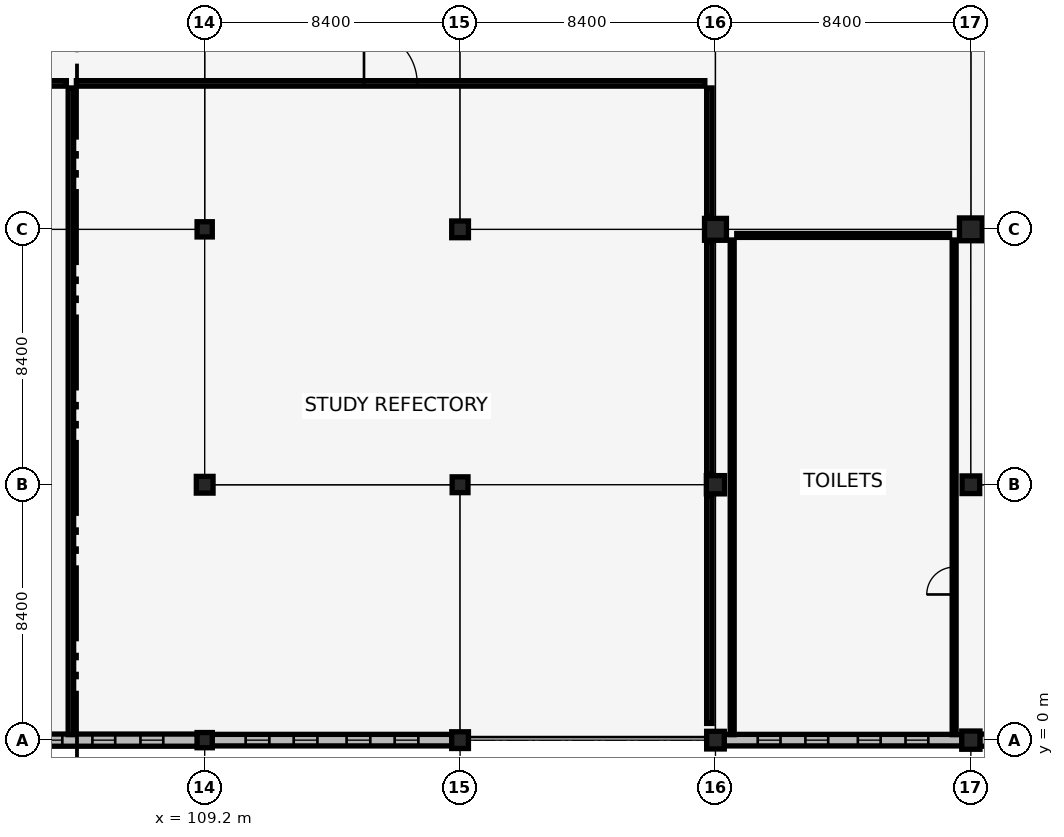
"""IFC4 building model, lengths in metres.
Left out: names, types, materials, properties, quantities, classifications, styles, units other than length and angle.
Written with IfcOpenShell. Run it as: python <this file> out.ifc"""

import sys

from ifc_helpers import new_model, si_unit, direction, frame, frame_2d, origin, origin_2d, place, context, subcontext, project, spatial, rectangle, extrude, element, fill, save


model = new_model("IFC4")
c1 = context("Model", 3, precision=1e-05, world=origin(), true_north=direction((0.0, 1.0)))
c2 = subcontext(c1, "Body", "Model", "MODEL_VIEW")
j1 = project(units=[si_unit("LENGTHUNIT", "METRE"), si_unit("PLANEANGLEUNIT", "RADIAN")], contexts=[c1])
p1 = place(None, origin())
s1 = spatial("IfcSite", under=j1, at=p1, CompositionType="ELEMENT")
p2 = place(p1, origin())
s2 = spatial("IfcBuilding", under=s1, at=p2, CompositionType="ELEMENT")
p3 = place(p2, frame((0.0, 0.0, 5.44)))
s3 = spatial("IfcBuildingStorey", under=s2, at=p3, CompositionType="ELEMENT", Elevation=5.44)
p4 = place(p3, frame((109.2, 0.0, 0.0), z_axis=(0.0, 0.0, 1.0), x_axis=(1.0, 0.0, 0.0)))
e1 = element("IfcColumn", 1, at=p4, inside=s3, PredefinedType="COLUMN", context=c2, shape_type="SweptSolid", body=[
    extrude(rectangle(XDim=0.5, YDim=0.5, at=origin_2d()), origin(), (0.0, 0.0, 1.0), 4.12),
])
p5 = place(p3, frame((109.2, 8.4, 0.0), z_axis=(0.0, 0.0, 1.0), x_axis=(1.0, 0.0, 0.0)))
e2 = element("IfcColumn", 2, at=p5, inside=s3, PredefinedType="COLUMN", context=c2, shape_type="SweptSolid", body=[
    extrude(rectangle(XDim=0.55, YDim=0.55, at=origin_2d()), origin(), (0.0, 0.0, 1.0), 4.12),
])
p6 = place(p3, frame((109.2, 16.8, 0.0), z_axis=(0.0, 0.0, 1.0), x_axis=(1.0, 0.0, 0.0)))
e3 = element("IfcColumn", 3, at=p6, inside=s3, PredefinedType="COLUMN", context=c2, shape_type="SweptSolid", body=[
    extrude(rectangle(XDim=0.5, YDim=0.5, at=origin_2d()), origin(), (0.0, 0.0, 1.0), 4.12),
])
p7 = place(p3, frame((117.6, 0.0, 0.0), z_axis=(0.0, 0.0, 1.0), x_axis=(1.0, 0.0, 0.0)))
e4 = element("IfcColumn", 4, at=p7, inside=s3, PredefinedType="COLUMN", context=c2, shape_type="SweptSolid", body=[
    extrude(rectangle(XDim=0.55, YDim=0.55, at=origin_2d()), origin(), (0.0, 0.0, 1.0), 4.12),
])
p8 = place(p3, frame((117.6, 8.4, 0.0), z_axis=(0.0, 0.0, 1.0), x_axis=(1.0, 0.0, 0.0)))
e5 = element("IfcColumn", 5, at=p8, inside=s3, PredefinedType="COLUMN", context=c2, shape_type="SweptSolid", body=[
    extrude(rectangle(XDim=0.52, YDim=0.52, at=origin_2d()), origin(), (0.0, 0.0, 1.0), 4.12),
])
p9 = place(p3, frame((117.6, 16.8, 0.0), z_axis=(0.0, 0.0, 1.0), x_axis=(1.0, 0.0, 0.0)))
e6 = element("IfcColumn", 6, at=p9, inside=s3, PredefinedType="COLUMN", context=c2, shape_type="SweptSolid", body=[
    extrude(rectangle(XDim=0.55, YDim=0.55, at=origin_2d()), origin(), (0.0, 0.0, 1.0), 4.12),
])
p10 = place(p3, frame((126.0, 0.0, 0.0), z_axis=(0.0, 0.0, 1.0), x_axis=(1.0, 0.0, 0.0)))
e7 = element("IfcColumn", 7, at=p10, inside=s3, PredefinedType="COLUMN", context=c2, shape_type="SweptSolid", body=[
    extrude(rectangle(XDim=0.58, YDim=0.58, at=origin_2d()), origin(), (0.0, 0.0, 1.0), 4.12),
])
p11 = place(p3, frame((126.0, 8.4, 0.0), z_axis=(0.0, 0.0, 1.0), x_axis=(1.0, 0.0, 0.0)))
e8 = element("IfcColumn", 8, at=p11, inside=s3, PredefinedType="COLUMN", context=c2, shape_type="SweptSolid", body=[
    extrude(rectangle(XDim=0.6, YDim=0.6, at=origin_2d()), origin(), (0.0, 0.0, 1.0), 4.12),
])
p12 = place(p3, frame((126.0, 16.8, 0.0), z_axis=(0.0, 0.0, 1.0), x_axis=(1.0, 0.0, 0.0)))
e9 = element("IfcColumn", 9, at=p12, inside=s3, PredefinedType="COLUMN", context=c2, shape_type="SweptSolid", body=[
    extrude(rectangle(XDim=0.72, YDim=0.72, at=origin_2d()), origin(), (0.0, 0.0, 1.0), 4.12),
])
p13 = place(p3, frame((134.4, 0.0, 0.0), z_axis=(0.0, 0.0, 1.0), x_axis=(1.0, 0.0, 0.0)))
e10 = element("IfcColumn", 10, at=p13, inside=s3, PredefinedType="COLUMN", context=c2, shape_type="SweptSolid", body=[
    extrude(rectangle(XDim=0.6, YDim=0.6, at=origin_2d()), origin(), (0.0, 0.0, 1.0), 4.12),
])
p14 = place(p3, frame((134.4, 8.4, 0.0), z_axis=(0.0, 0.0, 1.0), x_axis=(1.0, 0.0, 0.0)))
e11 = element("IfcColumn", 11, at=p14, inside=s3, PredefinedType="COLUMN", context=c2, shape_type="SweptSolid", body=[
    extrude(rectangle(XDim=0.58, YDim=0.58, at=origin_2d()), origin(), (0.0, 0.0, 1.0), 4.12),
])
p15 = place(p3, frame((134.4, 16.8, 0.0), z_axis=(0.0, 0.0, 1.0), x_axis=(1.0, 0.0, 0.0)))
e12 = element("IfcColumn", 12, at=p15, inside=s3, PredefinedType="COLUMN", context=c2, shape_type="SweptSolid", body=[
    extrude(rectangle(XDim=0.75, YDim=0.75, at=origin_2d()), origin(), (0.0, 0.0, 1.0), 4.12),
])
p16 = place(p3, frame((101.06, 0.0, 0.0), z_axis=(0.0, 0.0, 1.0), x_axis=(1.0, 0.0, 0.0)))
e13 = element("IfcWall", 13, at=p16, inside=s3, PredefinedType="SOLIDWALL", context=c2, shape_type="SweptSolid", body=[
    extrude(rectangle(XDim=7.905, YDim=0.4, at=frame_2d((3.953, 0.0))), origin(), (0.0, 0.0, 1.0), 3.38),
])
p17 = place(p16, frame((1.127, 0.0, 0.7)))
e14 = element("IfcOpeningElement", 14, at=p17, cuts=e13, PredefinedType="OPENING", context=c2, shape_type="SweptSolid", body=[
    extrude(rectangle(XDim=0.75, YDim=2.1, at=frame_2d((0.375, 1.05))), frame((0.0, 0.21, 0.0), z_axis=(0.0, -1.0, 0.0), x_axis=(1.0, 0.0, 0.0)), (0.0, 0.0, 1.0), 0.42),
])
p18 = place(p16, frame((2.708, 0.0, 0.7)))
e15 = element("IfcOpeningElement", 15, at=p18, cuts=e13, PredefinedType="OPENING", context=c2, shape_type="SweptSolid", body=[
    extrude(rectangle(XDim=0.75, YDim=2.1, at=frame_2d((0.375, 1.05))), frame((0.0, 0.21, 0.0), z_axis=(0.0, -1.0, 0.0), x_axis=(1.0, 0.0, 0.0)), (0.0, 0.0, 1.0), 0.42),
])
p19 = place(p16, frame((4.447, 0.0, 0.7)))
e16 = element("IfcOpeningElement", 16, at=p19, cuts=e13, PredefinedType="OPENING", context=c2, shape_type="SweptSolid", body=[
    extrude(rectangle(XDim=0.75, YDim=2.1, at=frame_2d((0.375, 1.05))), frame((0.0, 0.21, 0.0), z_axis=(0.0, -1.0, 0.0), x_axis=(1.0, 0.0, 0.0)), (0.0, 0.0, 1.0), 0.42),
])
p20 = place(p16, frame((6.028, 0.0, 0.7)))
e17 = element("IfcOpeningElement", 17, at=p20, cuts=e13, PredefinedType="OPENING", context=c2, shape_type="SweptSolid", body=[
    extrude(rectangle(XDim=0.75, YDim=2.1, at=frame_2d((0.375, 1.05))), frame((0.0, 0.21, 0.0), z_axis=(0.0, -1.0, 0.0), x_axis=(1.0, 0.0, 0.0)), (0.0, 0.0, 1.0), 0.42),
])
p21 = place(p3, frame((109.435, 0.0, 0.0), z_axis=(0.0, 0.0, 1.0), x_axis=(1.0, 0.0, 0.0)))
e18 = element("IfcWall", 18, at=p21, inside=s3, PredefinedType="SOLIDWALL", context=c2, shape_type="SweptSolid", body=[
    extrude(rectangle(XDim=7.905, YDim=0.38, at=frame_2d((3.953, 0.0))), origin(), (0.0, 0.0, 1.0), 3.38),
])
p22 = place(p21, frame((1.112, 0.0, 0.7)))
e19 = element("IfcOpeningElement", 19, at=p22, cuts=e18, PredefinedType="OPENING", context=c2, shape_type="SweptSolid", body=[
    extrude(rectangle(XDim=0.78, YDim=2.35, at=frame_2d((0.39, 1.175))), frame((0.0, 0.2, 0.0), z_axis=(0.0, -1.0, 0.0), x_axis=(1.0, 0.0, 0.0)), (0.0, 0.0, 1.0), 0.4),
])
p23 = place(p21, frame((2.693, 0.0, 0.7)))
e20 = element("IfcOpeningElement", 20, at=p23, cuts=e18, PredefinedType="OPENING", context=c2, shape_type="SweptSolid", body=[
    extrude(rectangle(XDim=0.78, YDim=2.35, at=frame_2d((0.39, 1.175))), frame((0.0, 0.2, 0.0), z_axis=(0.0, -1.0, 0.0), x_axis=(1.0, 0.0, 0.0)), (0.0, 0.0, 1.0), 0.4),
])
p24 = place(p21, frame((4.432, 0.0, 0.7)))
e21 = element("IfcOpeningElement", 21, at=p24, cuts=e18, PredefinedType="OPENING", context=c2, shape_type="SweptSolid", body=[
    extrude(rectangle(XDim=0.78, YDim=2.35, at=frame_2d((0.39, 1.175))), frame((0.0, 0.2, 0.0), z_axis=(0.0, -1.0, 0.0), x_axis=(1.0, 0.0, 0.0)), (0.0, 0.0, 1.0), 0.4),
])
p25 = place(p21, frame((6.013, 0.0, 0.7)))
e22 = element("IfcOpeningElement", 22, at=p25, cuts=e18, PredefinedType="OPENING", context=c2, shape_type="SweptSolid", body=[
    extrude(rectangle(XDim=0.78, YDim=2.35, at=frame_2d((0.39, 1.175))), frame((0.0, 0.2, 0.0), z_axis=(0.0, -1.0, 0.0), x_axis=(1.0, 0.0, 0.0)), (0.0, 0.0, 1.0), 0.4),
])
p26 = place(p3, frame((126.275, 0.0, 0.0), z_axis=(0.0, 0.0, 1.0), x_axis=(1.0, 0.0, 0.0)))
e23 = element("IfcWall", 23, at=p26, inside=s3, PredefinedType="SOLIDWALL", context=c2, shape_type="SweptSolid", body=[
    extrude(rectangle(XDim=7.84, YDim=0.38, at=frame_2d((3.92, 0.0))), origin(), (0.0, 0.0, 1.0), 3.38),
])
p27 = place(p26, frame((1.115, 0.0, 0.7)))
e24 = element("IfcOpeningElement", 24, at=p27, cuts=e23, PredefinedType="OPENING", context=c2, shape_type="SweptSolid", body=[
    extrude(rectangle(XDim=0.75, YDim=2.1, at=frame_2d((0.375, 1.05))), frame((0.0, 0.2, 0.0), z_axis=(0.0, -1.0, 0.0), x_axis=(1.0, 0.0, 0.0)), (0.0, 0.0, 1.0), 0.4),
])
p28 = place(p26, frame((2.683, 0.0, 0.7)))
e25 = element("IfcOpeningElement", 25, at=p28, cuts=e23, PredefinedType="OPENING", context=c2, shape_type="SweptSolid", body=[
    extrude(rectangle(XDim=0.75, YDim=2.1, at=frame_2d((0.375, 1.05))), frame((0.0, 0.2, 0.0), z_axis=(0.0, -1.0, 0.0), x_axis=(1.0, 0.0, 0.0)), (0.0, 0.0, 1.0), 0.4),
])
p29 = place(p26, frame((4.407, 0.0, 0.7)))
e26 = element("IfcOpeningElement", 26, at=p29, cuts=e23, PredefinedType="OPENING", context=c2, shape_type="SweptSolid", body=[
    extrude(rectangle(XDim=0.75, YDim=2.1, at=frame_2d((0.375, 1.05))), frame((0.0, 0.2, 0.0), z_axis=(0.0, -1.0, 0.0), x_axis=(1.0, 0.0, 0.0)), (0.0, 0.0, 1.0), 0.4),
])
p30 = place(p26, frame((5.975, 0.0, 0.7)))
e27 = element("IfcOpeningElement", 27, at=p30, cuts=e23, PredefinedType="OPENING", context=c2, shape_type="SweptSolid", body=[
    extrude(rectangle(XDim=0.75, YDim=2.1, at=frame_2d((0.375, 1.05))), frame((0.0, 0.2, 0.0), z_axis=(0.0, -1.0, 0.0), x_axis=(1.0, 0.0, 0.0)), (0.0, 0.0, 1.0), 0.4),
])
p31 = place(p3, frame((134.685, 0.0, 0.0), z_axis=(0.0, 0.0, 1.0), x_axis=(1.0, 0.0, 0.0)))
e28 = element("IfcWall", 28, at=p31, inside=s3, PredefinedType="SOLIDWALL", context=c2, shape_type="SweptSolid", body=[
    extrude(rectangle(XDim=7.84, YDim=0.4, at=frame_2d((3.92, 0.0))), origin(), (0.0, 0.0, 1.0), 3.38),
])
p32 = place(p31, frame((1.115, 0.0, 0.7)))
e29 = element("IfcOpeningElement", 29, at=p32, cuts=e28, PredefinedType="OPENING", context=c2, shape_type="SweptSolid", body=[
    extrude(rectangle(XDim=0.75, YDim=2.1, at=frame_2d((0.375, 1.05))), frame((0.0, 0.21, 0.0), z_axis=(0.0, -1.0, 0.0), x_axis=(1.0, 0.0, 0.0)), (0.0, 0.0, 1.0), 0.42),
])
p33 = place(p31, frame((4.407, 0.0, 0.7)))
e30 = element("IfcOpeningElement", 30, at=p33, cuts=e28, PredefinedType="OPENING", context=c2, shape_type="SweptSolid", body=[
    extrude(rectangle(XDim=0.75, YDim=2.1, at=frame_2d((0.375, 1.05))), frame((0.0, 0.21, 0.0), z_axis=(0.0, -1.0, 0.0), x_axis=(1.0, 0.0, 0.0)), (0.0, 0.0, 1.0), 0.42),
])
p34 = place(p31, frame((5.975, 0.0, 0.7)))
e31 = element("IfcOpeningElement", 31, at=p34, cuts=e28, PredefinedType="OPENING", context=c2, shape_type="SweptSolid", body=[
    extrude(rectangle(XDim=0.75, YDim=2.1, at=frame_2d((0.375, 1.05))), frame((0.0, 0.21, 0.0), z_axis=(0.0, -1.0, 0.0), x_axis=(1.0, 0.0, 0.0)), (0.0, 0.0, 1.0), 0.42),
])
p35 = place(p3, frame((84.03, 21.6, 0.0), z_axis=(0.0, 0.0, 1.0), x_axis=(1.0, 0.0, 0.0)))
e32 = element("IfcWall", 32, at=p35, inside=s3, PredefinedType="PARTITIONING", context=c2, shape_type="SweptSolid", body=[
    extrude(rectangle(XDim=20.62, YDim=0.18, at=frame_2d((10.31, 0.0))), origin(), (0.0, 0.0, 1.0), 3.47),
])
p36 = place(p35, frame((9.435, 0.0, 0.0)))
e33 = element("IfcOpeningElement", 33, at=p36, cuts=e32, PredefinedType="OPENING", context=c2, shape_type="SweptSolid", body=[
    extrude(rectangle(XDim=1.75, YDim=2.3, at=frame_2d((0.875, 1.15))), frame((0.0, 0.1, 0.0), z_axis=(0.0, -1.0, 0.0), x_axis=(1.0, 0.0, 0.0)), (0.0, 0.0, 1.0), 0.2),
])
p37 = place(p3, frame((104.8, 0.18, 0.0), z_axis=(0.0, 0.0, 1.0), x_axis=(0.0, 1.0, 0.0)))
e34 = element("IfcWall", 34, at=p37, inside=s3, PredefinedType="PARTITIONING", context=c2, shape_type="SweptSolid", body=[
    extrude(rectangle(XDim=21.27, YDim=0.18, at=frame_2d((10.635, 0.0))), origin(), (0.0, 0.0, 1.0), 3.34),
])
p38 = place(p3, frame((104.98, 21.6, 0.0), z_axis=(0.0, 0.0, 1.0), x_axis=(1.0, 0.0, 0.0)))
e35 = element("IfcWall", 35, at=p38, inside=s3, PredefinedType="PARTITIONING", context=c2, shape_type="SweptSolid", body=[
    extrude(rectangle(XDim=20.67, YDim=0.18, at=frame_2d((10.335, 0.0))), origin(), (0.0, 0.0, 1.0), 3.47),
])
p39 = place(p38, frame((9.46, 0.0, 0.0)))
e36 = element("IfcOpeningElement", 36, at=p39, cuts=e35, PredefinedType="OPENING", context=c2, shape_type="SweptSolid", body=[
    extrude(rectangle(XDim=1.75, YDim=2.3, at=frame_2d((0.875, 1.15))), frame((0.0, 0.1, 0.0), z_axis=(0.0, -1.0, 0.0), x_axis=(1.0, 0.0, 0.0)), (0.0, 0.0, 1.0), 0.2),
])
p40 = place(p3, frame((125.8, 0.55, 0.0), z_axis=(0.0, 0.0, 1.0), x_axis=(0.0, 1.0, 0.0)))
e37 = element("IfcWall", 37, at=p40, inside=s3, PredefinedType="PARTITIONING", context=c2, shape_type="SweptSolid", body=[
    extrude(rectangle(XDim=7.49, YDim=0.18, at=frame_2d((3.745, 0.0))), origin(), (0.0, 0.0, 1.0), 3.6),
])
p41 = place(p3, frame((125.8, 8.76, 0.0), z_axis=(0.0, 0.0, 1.0), x_axis=(0.0, 1.0, 0.0)))
e38 = element("IfcWall", 38, at=p41, inside=s3, PredefinedType="PARTITIONING", context=c2, shape_type="SweptSolid", body=[
    extrude(rectangle(XDim=7.62, YDim=0.18, at=frame_2d((3.81, 0.0))), origin(), (0.0, 0.0, 1.0), 3.62),
])
p42 = place(p3, frame((125.8, 17.22, 0.0), z_axis=(0.0, 0.0, 1.0), x_axis=(0.0, 1.0, 0.0)))
e39 = element("IfcWall", 39, at=p42, inside=s3, PredefinedType="PARTITIONING", context=c2, shape_type="SweptSolid", body=[
    extrude(rectangle(XDim=4.23, YDim=0.18, at=frame_2d((2.115, 0.0))), origin(), (0.0, 0.0, 1.0), 3.6),
])
p43 = place(p3, frame((133.85, 0.18, 0.0), z_axis=(0.0, 0.0, 1.0), x_axis=(0.0, 1.0, 0.0)))
e40 = element("IfcWall", 40, at=p43, inside=s3, PredefinedType="PARTITIONING", context=c2, shape_type="SweptSolid", body=[
    extrude(rectangle(XDim=16.27, YDim=0.13, at=frame_2d((8.135, 0.0))), origin(), (0.0, 0.0, 1.0), 3.38),
])
p44 = place(p43, frame((4.611, 0.0, 0.0)))
e41 = element("IfcOpeningElement", 41, at=p44, cuts=e40, PredefinedType="OPENING", context=c2, shape_type="SweptSolid", body=[
    extrude(rectangle(XDim=0.9, YDim=2.1, at=frame_2d((0.45, 1.05))), frame((0.0, 0.075, 0.0), z_axis=(0.0, -1.0, 0.0), x_axis=(1.0, 0.0, 0.0)), (0.0, 0.0, 1.0), 0.15),
])
p45 = place(p3, frame((126.7, 16.6, 0.0), z_axis=(0.0, 0.0, 1.0), x_axis=(1.0, 0.0, 0.0)))
e42 = element("IfcWall", 42, at=p45, inside=s3, PredefinedType="PARTITIONING", context=c2, shape_type="SweptSolid", body=[
    extrude(rectangle(XDim=7.0, YDim=0.13, at=frame_2d((3.5, 0.0))), origin(), (0.0, 0.0, 1.0), 3.34),
])
p46 = place(p3, frame((126.55, 0.18, 0.0), z_axis=(0.0, 0.0, 1.0), x_axis=(0.0, 1.0, 0.0)))
e43 = element("IfcWall", 43, at=p46, inside=s3, PredefinedType="PARTITIONING", context=c2, shape_type="SweptSolid", body=[
    extrude(rectangle(XDim=16.27, YDim=0.13, at=frame_2d((8.135, 0.0))), origin(), (0.0, 0.0, 1.0), 3.38),
])
p47 = place(p18, origin())
e44 = element("IfcWindow", 44, at=p47, inside=s3, PartitioningType="DOUBLE_PANEL_VERTICAL", PredefinedType="WINDOW", context=c2, shape_type="SweptSolid", body=[
    extrude(rectangle(XDim=0.75, YDim=2.1, at=frame_2d((0.375, 1.05))), frame((0.0, 0.03, 0.0), z_axis=(0.0, -1.0, 0.0), x_axis=(1.0, 0.0, 0.0)), (0.0, 0.0, 1.0), 0.06),
])
fill(e15, e44)
p48 = place(p19, origin())
e45 = element("IfcWindow", 45, at=p48, inside=s3, PartitioningType="DOUBLE_PANEL_VERTICAL", PredefinedType="WINDOW", context=c2, shape_type="SweptSolid", body=[
    extrude(rectangle(XDim=0.75, YDim=2.1, at=frame_2d((0.375, 1.05))), frame((0.0, 0.03, 0.0), z_axis=(0.0, -1.0, 0.0), x_axis=(1.0, 0.0, 0.0)), (0.0, 0.0, 1.0), 0.06),
])
fill(e16, e45)
p49 = place(p20, origin())
e46 = element("IfcWindow", 46, at=p49, inside=s3, PartitioningType="DOUBLE_PANEL_VERTICAL", PredefinedType="WINDOW", context=c2, shape_type="SweptSolid", body=[
    extrude(rectangle(XDim=0.75, YDim=2.1, at=frame_2d((0.375, 1.05))), frame((0.0, 0.03, 0.0), z_axis=(0.0, -1.0, 0.0), x_axis=(1.0, 0.0, 0.0)), (0.0, 0.0, 1.0), 0.06),
])
fill(e17, e46)
p50 = place(p22, origin())
e47 = element("IfcWindow", 47, at=p50, inside=s3, PartitioningType="DOUBLE_PANEL_VERTICAL", PredefinedType="WINDOW", context=c2, shape_type="SweptSolid", body=[
    extrude(rectangle(XDim=0.78, YDim=2.35, at=frame_2d((0.39, 1.175))), frame((0.0, 0.03, 0.0), z_axis=(0.0, -1.0, 0.0), x_axis=(1.0, 0.0, 0.0)), (0.0, 0.0, 1.0), 0.06),
])
fill(e19, e47)
p51 = place(p23, origin())
e48 = element("IfcWindow", 48, at=p51, inside=s3, PartitioningType="DOUBLE_PANEL_VERTICAL", PredefinedType="WINDOW", context=c2, shape_type="SweptSolid", body=[
    extrude(rectangle(XDim=0.78, YDim=2.35, at=frame_2d((0.39, 1.175))), frame((0.0, 0.03, 0.0), z_axis=(0.0, -1.0, 0.0), x_axis=(1.0, 0.0, 0.0)), (0.0, 0.0, 1.0), 0.06),
])
fill(e20, e48)
p52 = place(p24, origin())
e49 = element("IfcWindow", 49, at=p52, inside=s3, PartitioningType="DOUBLE_PANEL_VERTICAL", PredefinedType="WINDOW", context=c2, shape_type="SweptSolid", body=[
    extrude(rectangle(XDim=0.78, YDim=2.35, at=frame_2d((0.39, 1.175))), frame((0.0, 0.03, 0.0), z_axis=(0.0, -1.0, 0.0), x_axis=(1.0, 0.0, 0.0)), (0.0, 0.0, 1.0), 0.06),
])
fill(e21, e49)
p53 = place(p25, origin())
e50 = element("IfcWindow", 50, at=p53, inside=s3, PartitioningType="DOUBLE_PANEL_VERTICAL", PredefinedType="WINDOW", context=c2, shape_type="SweptSolid", body=[
    extrude(rectangle(XDim=0.78, YDim=2.35, at=frame_2d((0.39, 1.175))), frame((0.0, 0.03, 0.0), z_axis=(0.0, -1.0, 0.0), x_axis=(1.0, 0.0, 0.0)), (0.0, 0.0, 1.0), 0.06),
])
fill(e22, e50)
p54 = place(p27, origin())
e51 = element("IfcWindow", 51, at=p54, inside=s3, PartitioningType="DOUBLE_PANEL_VERTICAL", PredefinedType="WINDOW", context=c2, shape_type="SweptSolid", body=[
    extrude(rectangle(XDim=0.75, YDim=2.1, at=frame_2d((0.375, 1.05))), frame((0.0, 0.03, 0.0), z_axis=(0.0, -1.0, 0.0), x_axis=(1.0, 0.0, 0.0)), (0.0, 0.0, 1.0), 0.06),
])
fill(e24, e51)
p55 = place(p28, origin())
e52 = element("IfcWindow", 52, at=p55, inside=s3, PartitioningType="DOUBLE_PANEL_VERTICAL", PredefinedType="WINDOW", context=c2, shape_type="SweptSolid", body=[
    extrude(rectangle(XDim=0.75, YDim=2.1, at=frame_2d((0.375, 1.05))), frame((0.0, 0.03, 0.0), z_axis=(0.0, -1.0, 0.0), x_axis=(1.0, 0.0, 0.0)), (0.0, 0.0, 1.0), 0.06),
])
fill(e25, e52)
p56 = place(p29, origin())
e53 = element("IfcWindow", 53, at=p56, inside=s3, PartitioningType="DOUBLE_PANEL_VERTICAL", PredefinedType="WINDOW", context=c2, shape_type="SweptSolid", body=[
    extrude(rectangle(XDim=0.75, YDim=2.1, at=frame_2d((0.375, 1.05))), frame((0.0, 0.03, 0.0), z_axis=(0.0, -1.0, 0.0), x_axis=(1.0, 0.0, 0.0)), (0.0, 0.0, 1.0), 0.06),
])
fill(e26, e53)
p57 = place(p30, origin())
e54 = element("IfcWindow", 54, at=p57, inside=s3, PartitioningType="DOUBLE_PANEL_VERTICAL", PredefinedType="WINDOW", context=c2, shape_type="SweptSolid", body=[
    extrude(rectangle(XDim=0.75, YDim=2.1, at=frame_2d((0.375, 1.05))), frame((0.0, 0.03, 0.0), z_axis=(0.0, -1.0, 0.0), x_axis=(1.0, 0.0, 0.0)), (0.0, 0.0, 1.0), 0.06),
])
fill(e27, e54)
p58 = place(p39, origin())
e55 = element("IfcDoor", 55, at=p58, inside=s3, OperationType="DOUBLE_DOOR_SINGLE_SWING", PredefinedType="DOOR", context=c2, shape_type="SweptSolid", body=[
    extrude(rectangle(XDim=1.75, YDim=2.3, at=frame_2d((0.875, 1.15))), frame((0.0, 0.025, 0.0), z_axis=(0.0, -1.0, 0.0), x_axis=(1.0, 0.0, 0.0)), (0.0, 0.0, 1.0), 0.05),
])
fill(e36, e55)
p59 = place(p44, origin())
e56 = element("IfcDoor", 56, at=p59, inside=s3, OperationType="SINGLE_SWING_LEFT", PredefinedType="DOOR", context=c2, shape_type="SweptSolid", body=[
    extrude(rectangle(XDim=0.9, YDim=2.1, at=frame_2d((0.45, 1.05))), frame((0.0, 0.025, 0.0), z_axis=(0.0, -1.0, 0.0), x_axis=(1.0, 0.0, 0.0)), (0.0, 0.0, 1.0), 0.05),
])
fill(e41, e56)
save(model, sys.argv[1])
